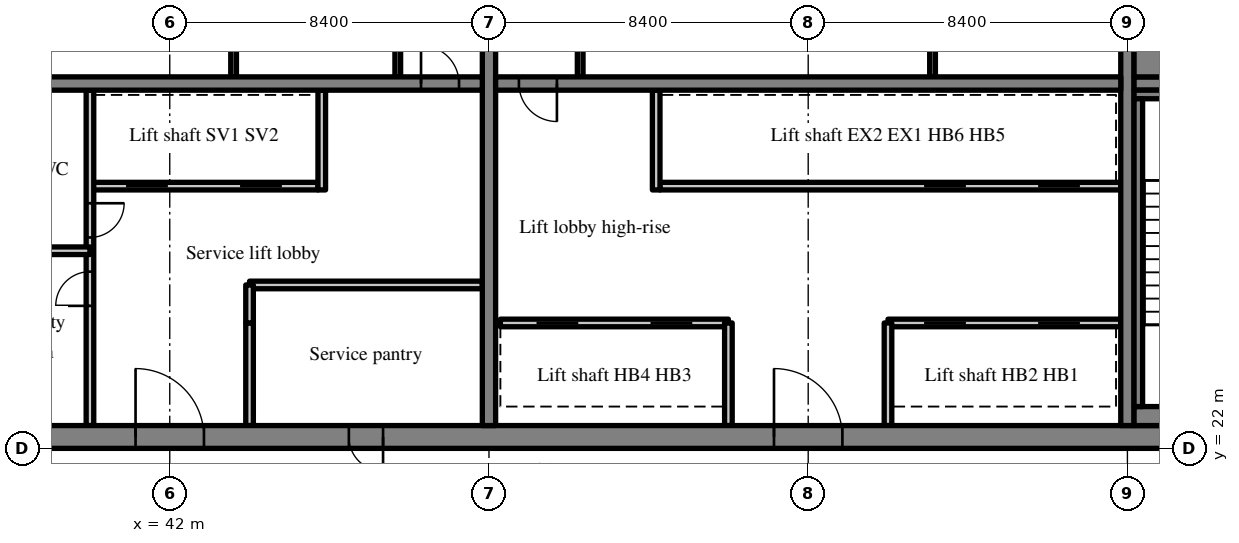
"""IFC4 building model, lengths in metres.
Left out: names, types, materials, properties, quantities, classifications, styles, units other than length and angle.
Written with IfcOpenShell. Run it as: python <this file> out.ifc"""

import sys

from ifc_helpers import new_model, si_unit, direction, frame, frame_2d, origin, place, context, subcontext, project, spatial, rectangle, extrude, source, transform, mapped, element, fill, save


model = new_model("IFC4")
c1 = context("Model", 3, precision=1e-05, world=origin(), true_north=direction((0.0, 1.0)))
c2 = subcontext(c1, "Body", "Model", "MODEL_VIEW")
j1 = project(units=[si_unit("LENGTHUNIT", "METRE"), si_unit("PLANEANGLEUNIT", "RADIAN")], contexts=[c1])
p1 = place(None, origin())
s1 = spatial("IfcSite", under=j1, at=p1, CompositionType="ELEMENT")
p2 = place(p1, origin())
s2 = spatial("IfcBuilding", under=s1, at=p2, CompositionType="ELEMENT")
p3 = place(p2, frame((0.0, 0.0, 237.4)))
s3 = spatial("IfcBuildingStorey", under=s2, at=p3, CompositionType="ELEMENT", Elevation=237.4)
m1 = source(origin(), c2, "Body", "SweptSolid", [
    extrude(rectangle(XDim=50.4, YDim=0.6, at=frame_2d((25.2, 0.0))), origin(), (0.0, 0.0, 1.0), 3.62),
])
p4 = place(p3, frame((25.2, 22.3, 0.0), z_axis=(0.0, 0.0, 1.0), x_axis=(1.0, 0.0, 0.0)))
e1 = element("IfcWall", 1, at=p4, inside=s3, PredefinedType="SHEAR", context=c2, shape_type="MappedRepresentation", body=[
    mapped(m1, transform((0.0, 0.0, 0.0), scale=1.0)),
])
m2 = source(origin(), c2, "Body", "SweptSolid", [
    extrude(rectangle(XDim=1.8, YDim=2.1, at=frame_2d((0.9, 1.05))), frame((0.0, 0.31, 0.0), z_axis=(0.0, -1.0, 0.0), x_axis=(1.0, 0.0, 0.0)), (0.0, 0.0, 1.0), 0.62),
])
p5 = place(p4, frame((15.9, 0.0, 0.0)))
e2 = element("IfcOpeningElement", 2, at=p5, cuts=e1, PredefinedType="OPENING", context=c2, shape_type="MappedRepresentation", body=[
    mapped(m2, transform((0.0, 0.0, 0.0), scale=1.0)),
])
m3 = source(origin(), c2, "Body", "SweptSolid", [
    extrude(rectangle(XDim=0.9, YDim=2.1, at=frame_2d((0.45, 1.05))), frame((0.0, 0.31, 0.0), z_axis=(0.0, -1.0, 0.0), x_axis=(1.0, 0.0, 0.0)), (0.0, 0.0, 1.0), 0.62),
])
p6 = place(p4, frame((9.687, 0.0, 0.0)))
e3 = element("IfcOpeningElement", 3, at=p6, cuts=e1, PredefinedType="OPENING", context=c2, shape_type="MappedRepresentation", body=[
    mapped(m3, transform((0.0, 0.0, 0.0), scale=1.0)),
])
p7 = place(p4, frame((21.513, 0.0, 0.0)))
e4 = element("IfcOpeningElement", 4, at=p7, cuts=e1, PredefinedType="OPENING", context=c2, shape_type="MappedRepresentation", body=[
    mapped(m3, transform((0.0, 0.0, 0.0), scale=1.0)),
])
p8 = place(p4, frame((32.7, 0.0, 0.0)))
e5 = element("IfcOpeningElement", 5, at=p8, cuts=e1, PredefinedType="OPENING", context=c2, shape_type="MappedRepresentation", body=[
    mapped(m2, transform((0.0, 0.0, 0.0), scale=1.0)),
])
m4 = source(origin(), c2, "Body", "SweptSolid", [
    extrude(rectangle(XDim=1.2, YDim=2.1, at=frame_2d((0.6, 1.05))), frame((0.0, 0.31, 0.0), z_axis=(0.0, -1.0, 0.0), x_axis=(1.0, 0.0, 0.0)), (0.0, 0.0, 1.0), 0.62),
])
p9 = place(p4, frame((6.488, 0.0, 0.0)))
e6 = element("IfcOpeningElement", 6, at=p9, cuts=e1, PredefinedType="OPENING", context=c2, shape_type="MappedRepresentation", body=[
    mapped(m4, transform((0.0, 0.0, 0.0), scale=1.0)),
])
p10 = place(p4, frame((47.925, 0.0, 0.0)))
e7 = element("IfcOpeningElement", 7, at=p10, cuts=e1, PredefinedType="OPENING", context=c2, shape_type="MappedRepresentation", body=[
    mapped(m4, transform((0.0, 0.0, 0.0), scale=1.0)),
])
m5 = source(origin(), c2, "Body", "SweptSolid", [
    extrude(rectangle(XDim=18.8, YDim=0.35, at=frame_2d((9.4, 0.0))), origin(), (0.0, 0.0, 1.0), 3.62),
])
p11 = place(p3, frame((50.4, 22.6, 0.0), z_axis=(0.0, 0.0, 1.0), x_axis=(0.0, 1.0, 0.0)))
e8 = element("IfcWall", 8, at=p11, inside=s3, PredefinedType="SHEAR", context=c2, shape_type="MappedRepresentation", body=[
    mapped(m5, transform((0.0, 0.0, 0.0), scale=1.0)),
])
m6 = source(origin(), c2, "Body", "SweptSolid", [
    extrude(rectangle(XDim=1.1, YDim=2.1, at=frame_2d((0.55, 1.05))), frame((0.0, 0.185, 0.0), z_axis=(0.0, -1.0, 0.0), x_axis=(1.0, 0.0, 0.0)), (0.0, 0.0, 1.0), 0.37),
])
p12 = place(p11, frame((12.85, 0.0, 0.0)))
e9 = element("IfcOpeningElement", 9, at=p12, cuts=e8, PredefinedType="OPENING", context=c2, shape_type="MappedRepresentation", body=[
    mapped(m6, transform((0.0, 0.0, 0.0), scale=1.0)),
])
p13 = place(p3, frame((67.2, 22.6, 0.0), z_axis=(0.0, 0.0, 1.0), x_axis=(0.0, 1.0, 0.0)))
e10 = element("IfcWall", 10, at=p13, inside=s3, PredefinedType="SHEAR", context=c2, shape_type="MappedRepresentation", body=[
    mapped(m5, transform((0.0, 0.0, 0.0), scale=1.0)),
])
m7 = source(origin(), c2, "Body", "SweptSolid", [
    extrude(rectangle(XDim=16.45, YDim=0.35, at=frame_2d((8.225, 0.0))), origin(), (0.0, 0.0, 1.0), 3.62),
])
p14 = place(p3, frame((33.775, 31.6, 0.0), z_axis=(0.0, 0.0, 1.0), x_axis=(1.0, 0.0, 0.0)))
e11 = element("IfcWall", 11, at=p14, inside=s3, PredefinedType="SHEAR", context=c2, shape_type="MappedRepresentation", body=[
    mapped(m7, transform((0.0, 0.0, 0.0), scale=1.0)),
])
m8 = source(origin(), c2, "Body", "SweptSolid", [
    extrude(rectangle(XDim=1.0, YDim=2.1, at=frame_2d((0.5, 1.05))), frame((0.0, 0.185, 0.0), z_axis=(0.0, -1.0, 0.0), x_axis=(1.0, 0.0, 0.0)), (0.0, 0.0, 1.0), 0.37),
])
p15 = place(p14, frame((14.837, 0.0, 0.0)))
e12 = element("IfcOpeningElement", 12, at=p15, cuts=e11, PredefinedType="OPENING", context=c2, shape_type="MappedRepresentation", body=[
    mapped(m8, transform((0.0, 0.0, 0.0), scale=1.0)),
])
m9 = source(origin(), c2, "Body", "SweptSolid", [
    extrude(rectangle(XDim=16.45, YDim=0.35, at=frame_2d((8.225, 0.0))), origin(), (0.0, 0.0, 1.0), 3.62),
])
p16 = place(p3, frame((50.575, 31.6, 0.0), z_axis=(0.0, 0.0, 1.0), x_axis=(1.0, 0.0, 0.0)))
e13 = element("IfcWall", 13, at=p16, inside=s3, PredefinedType="SHEAR", context=c2, shape_type="MappedRepresentation", body=[
    mapped(m9, transform((0.0, 0.0, 0.0), scale=1.0)),
])
p17 = place(p16, frame((0.613, 0.0, 0.0)))
e14 = element("IfcOpeningElement", 14, at=p17, cuts=e13, PredefinedType="OPENING", context=c2, shape_type="MappedRepresentation", body=[
    mapped(m8, transform((0.0, 0.0, 0.0), scale=1.0)),
])
m10 = source(origin(), c2, "Body", "SweptSolid", [
    extrude(rectangle(XDim=7.625, YDim=0.35, at=frame_2d((3.812, 0.0))), origin(), (0.0, 0.0, 1.0), 3.62),
])
p18 = place(p3, frame((67.375, 31.6, 0.0), z_axis=(0.0, 0.0, 1.0), x_axis=(1.0, 0.0, 0.0)))
e15 = element("IfcWall", 15, at=p18, inside=s3, PredefinedType="SHEAR", context=c2, shape_type="MappedRepresentation", body=[
    mapped(m10, transform((0.0, 0.0, 0.0), scale=1.0)),
])
p19 = place(p18, frame((5.8, 0.0, 0.0)))
e16 = element("IfcOpeningElement", 16, at=p19, cuts=e15, PredefinedType="OPENING", context=c2, shape_type="MappedRepresentation", body=[
    mapped(m6, transform((0.0, 0.0, 0.0), scale=1.0)),
])
m11 = source(origin(), c2, "Body", "SweptSolid", [
    extrude(rectangle(XDim=6.0, YDim=0.2, at=frame_2d((3.0, 0.0))), origin(), (0.0, 0.0, 1.0), 3.62),
])
p20 = place(p3, frame((39.9, 28.9, 0.0), z_axis=(0.0, 0.0, 1.0), x_axis=(1.0, 0.0, 0.0)))
e17 = element("IfcWall", 17, at=p20, inside=s3, PredefinedType="SOLIDWALL", context=c2, shape_type="MappedRepresentation", body=[
    mapped(m11, transform((0.0, 0.0, 0.0), scale=1.0)),
])
m12 = source(origin(), c2, "Body", "SweptSolid", [
    extrude(rectangle(XDim=1.1, YDim=2.1, at=frame_2d((0.55, 1.05))), frame((0.0, 0.11, 0.0), z_axis=(0.0, -1.0, 0.0), x_axis=(1.0, 0.0, 0.0)), (0.0, 0.0, 1.0), 0.22),
])
p21 = place(p20, frame((0.95, 0.0, 0.0)))
e18 = element("IfcOpeningElement", 18, at=p21, cuts=e17, PredefinedType="OPENING", context=c2, shape_type="MappedRepresentation", body=[
    mapped(m12, transform((0.0, 0.0, 0.0), scale=1.0)),
])
p22 = place(p20, frame((3.95, 0.0, 0.0)))
e19 = element("IfcOpeningElement", 19, at=p22, cuts=e17, PredefinedType="OPENING", context=c2, shape_type="MappedRepresentation", body=[
    mapped(m12, transform((0.0, 0.0, 0.0), scale=1.0)),
])
m13 = source(origin(), c2, "Body", "SweptSolid", [
    extrude(rectangle(XDim=8.825, YDim=0.2, at=frame_2d((4.413, 0.0))), origin(), (0.0, 0.0, 1.0), 3.62),
])
p23 = place(p3, frame((39.9, 22.6, 0.0), z_axis=(0.0, 0.0, 1.0), x_axis=(0.0, 1.0, 0.0)))
e20 = element("IfcWall", 20, at=p23, inside=s3, PredefinedType="PARTITIONING", context=c2, shape_type="MappedRepresentation", body=[
    mapped(m13, transform((0.0, 0.0, 0.0), scale=1.0)),
])
m14 = source(origin(), c2, "Body", "SweptSolid", [
    extrude(rectangle(XDim=0.9, YDim=2.1, at=frame_2d((0.45, 1.05))), frame((0.0, 0.11, 0.0), z_axis=(0.0, -1.0, 0.0), x_axis=(1.0, 0.0, 0.0)), (0.0, 0.0, 1.0), 0.22),
])
p24 = place(p23, frame((3.15, 0.0, 0.0)))
e21 = element("IfcOpeningElement", 21, at=p24, cuts=e20, PredefinedType="OPENING", context=c2, shape_type="MappedRepresentation", body=[
    mapped(m14, transform((0.0, 0.0, 0.0), scale=1.0)),
])
p25 = place(p23, frame((4.95, 0.0, 0.0)))
e22 = element("IfcOpeningElement", 22, at=p25, cuts=e20, PredefinedType="OPENING", context=c2, shape_type="MappedRepresentation", body=[
    mapped(m14, transform((0.0, 0.0, 0.0), scale=1.0)),
])
m15 = source(origin(), c2, "Body", "SweptSolid", [
    extrude(rectangle(XDim=2.7, YDim=0.2, at=frame_2d((1.35, 0.0))), origin(), (0.0, 0.0, 1.0), 3.62),
])
p26 = place(p3, frame((44.1, 22.6, 0.0), z_axis=(0.0, 0.0, 1.0), x_axis=(0.0, 1.0, 0.0)))
e23 = element("IfcWall", 23, at=p26, inside=s3, PredefinedType="PARTITIONING", context=c2, shape_type="MappedRepresentation", body=[
    mapped(m15, transform((0.0, 0.0, 0.0), scale=1.0)),
])
m16 = source(origin(), c2, "Body", "SweptSolid", [
    extrude(rectangle(XDim=2.625, YDim=0.2, at=frame_2d((1.312, 0.0))), origin(), (0.0, 0.0, 1.0), 3.62),
])
p27 = place(p3, frame((46.0, 28.8, 0.0), z_axis=(0.0, 0.0, 1.0), x_axis=(0.0, 1.0, 0.0)))
e24 = element("IfcWall", 24, at=p27, inside=s3, PredefinedType="SOLIDWALL", context=c2, shape_type="MappedRepresentation", body=[
    mapped(m16, transform((0.0, 0.0, 0.0), scale=1.0)),
])
m17 = source(origin(), c2, "Body", "SweptSolid", [
    extrude(rectangle(XDim=3.0, YDim=0.2, at=frame_2d((1.5, 0.0))), origin(), (0.0, 0.0, 1.0), 3.62),
])
p28 = place(p3, frame((36.9, 27.2, 0.0), z_axis=(0.0, 0.0, 1.0), x_axis=(1.0, 0.0, 0.0)))
e25 = element("IfcWall", 25, at=p28, inside=s3, PredefinedType="PARTITIONING", context=c2, shape_type="MappedRepresentation", body=[
    mapped(m17, transform((0.0, 0.0, 0.0), scale=1.0)),
])
m18 = source(origin(), c2, "Body", "SweptSolid", [
    extrude(rectangle(XDim=6.125, YDim=0.2, at=frame_2d((3.062, 0.0))), origin(), (0.0, 0.0, 1.0), 3.62),
])
p29 = place(p3, frame((44.1, 26.3, 0.0), z_axis=(0.0, 0.0, 1.0), x_axis=(1.0, 0.0, 0.0)))
e26 = element("IfcWall", 26, at=p29, inside=s3, PredefinedType="PARTITIONING", context=c2, shape_type="MappedRepresentation", body=[
    mapped(m18, transform((0.0, 0.0, 0.0), scale=1.0)),
])
m19 = source(origin(), c2, "Body", "SweptSolid", [
    extrude(rectangle(XDim=1.0, YDim=0.2, at=frame_2d((0.5, 0.0))), origin(), (0.0, 0.0, 1.0), 3.62),
])
p30 = place(p3, frame((44.1, 25.3, 0.0), z_axis=(0.0, 0.0, 1.0), x_axis=(0.0, 1.0, 0.0)))
e27 = element("IfcWall", 27, at=p30, inside=s3, PredefinedType="PARTITIONING", context=c2, shape_type="MappedRepresentation", body=[
    mapped(m19, transform((0.0, 0.0, 0.0), scale=1.0)),
])
m20 = source(origin(), c2, "Body", "SweptSolid", [
    extrude(rectangle(XDim=3.225, YDim=0.15, at=frame_2d((1.613, 0.0))), origin(), (0.0, 0.0, 1.0), 3.62),
])
for number, where, z_axis, x_axis in (
    (28, (48.0, 31.775, 0.0), (0.0, 0.0, 1.0), (0.0, 1.0, 0.0)),
    (29, (43.68, 31.775, 0.0), (0.0, 0.0, 1.0), (0.0, 1.0, 0.0)),
):
    element("IfcWall", number, at=place(p3, frame(where, z_axis=z_axis, x_axis=x_axis)), inside=s3, PredefinedType="PARTITIONING", context=c2, shape_type="MappedRepresentation", body=[
        mapped(m20, transform((0.0, 0.0, 0.0), scale=1.0)),
    ])
p31 = place(p3, frame((67.025, 25.3, 0.0), z_axis=(0.0, 0.0, 1.0), x_axis=(-1.0, 0.0, 0.0)))
e30 = element("IfcWall", 30, at=p31, inside=s3, PredefinedType="SOLIDWALL", context=c2, shape_type="MappedRepresentation", body=[
    mapped(m18, transform((0.0, 0.0, 0.0), scale=1.0)),
])
p32 = place(p31, frame((1.075, 0.0, 0.0)))
e31 = element("IfcOpeningElement", 31, at=p32, cuts=e30, PredefinedType="OPENING", context=c2, shape_type="MappedRepresentation", body=[
    mapped(m12, transform((0.0, 0.0, 0.0), scale=1.0)),
])
p33 = place(p31, frame((4.075, 0.0, 0.0)))
e32 = element("IfcOpeningElement", 32, at=p33, cuts=e30, PredefinedType="OPENING", context=c2, shape_type="MappedRepresentation", body=[
    mapped(m12, transform((0.0, 0.0, 0.0), scale=1.0)),
])
p34 = place(p3, frame((56.7, 25.3, 0.0), z_axis=(0.0, 0.0, 1.0), x_axis=(-1.0, 0.0, 0.0)))
e33 = element("IfcWall", 33, at=p34, inside=s3, PredefinedType="SOLIDWALL", context=c2, shape_type="MappedRepresentation", body=[
    mapped(m11, transform((0.0, 0.0, 0.0), scale=1.0)),
])
p35 = place(p34, frame((0.95, 0.0, 0.0)))
e34 = element("IfcOpeningElement", 34, at=p35, cuts=e33, PredefinedType="OPENING", context=c2, shape_type="MappedRepresentation", body=[
    mapped(m12, transform((0.0, 0.0, 0.0), scale=1.0)),
])
p36 = place(p34, frame((3.95, 0.0, 0.0)))
e35 = element("IfcOpeningElement", 35, at=p36, cuts=e33, PredefinedType="OPENING", context=c2, shape_type="MappedRepresentation", body=[
    mapped(m12, transform((0.0, 0.0, 0.0), scale=1.0)),
])
m21 = source(origin(), c2, "Body", "SweptSolid", [
    extrude(rectangle(XDim=12.125, YDim=0.2, at=frame_2d((6.062, 0.0))), origin(), (0.0, 0.0, 1.0), 3.62),
])
p37 = place(p3, frame((67.025, 28.9, 0.0), z_axis=(0.0, 0.0, 1.0), x_axis=(-1.0, 0.0, 0.0)))
e36 = element("IfcWall", 36, at=p37, inside=s3, PredefinedType="SOLIDWALL", context=c2, shape_type="MappedRepresentation", body=[
    mapped(m21, transform((0.0, 0.0, 0.0), scale=1.0)),
])
p38 = place(p37, frame((1.075, 0.0, 0.0)))
e37 = element("IfcOpeningElement", 37, at=p38, cuts=e36, PredefinedType="OPENING", context=c2, shape_type="MappedRepresentation", body=[
    mapped(m12, transform((0.0, 0.0, 0.0), scale=1.0)),
])
p39 = place(p37, frame((4.075, 0.0, 0.0)))
e38 = element("IfcOpeningElement", 38, at=p39, cuts=e36, PredefinedType="OPENING", context=c2, shape_type="MappedRepresentation", body=[
    mapped(m12, transform((0.0, 0.0, 0.0), scale=1.0)),
])
for number, where, z_axis, x_axis in (
    (39, (60.9, 22.6, 0.0), (0.0, 0.0, 1.0), (0.0, 1.0, 0.0)),
    (40, (56.7, 22.6, 0.0), (0.0, 0.0, 1.0), (0.0, 1.0, 0.0)),
):
    element("IfcWall", number, at=place(p3, frame(where, z_axis=z_axis, x_axis=x_axis)), inside=s3, PredefinedType="SOLIDWALL", context=c2, shape_type="MappedRepresentation", body=[
        mapped(m15, transform((0.0, 0.0, 0.0), scale=1.0)),
    ])
p40 = place(p3, frame((54.8, 28.8, 0.0), z_axis=(0.0, 0.0, 1.0), x_axis=(0.0, 1.0, 0.0)))
e41 = element("IfcWall", 41, at=p40, inside=s3, PredefinedType="SOLIDWALL", context=c2, shape_type="MappedRepresentation", body=[
    mapped(m16, transform((0.0, 0.0, 0.0), scale=1.0)),
])
for number, where, z_axis, x_axis in (
    (42, (52.8, 31.775, 0.0), (0.0, 0.0, 1.0), (0.0, 1.0, 0.0)),
    (43, (62.072, 31.775, 0.0), (0.0, 0.0, 1.0), (0.0, 1.0, 0.0)),
):
    element("IfcWall", number, at=place(p3, frame(where, z_axis=z_axis, x_axis=x_axis)), inside=s3, PredefinedType="PARTITIONING", context=c2, shape_type="MappedRepresentation", body=[
        mapped(m20, transform((0.0, 0.0, 0.0), scale=1.0)),
    ])
m22 = source(origin(), c2, "Body", "SweptSolid", [
    extrude(rectangle(XDim=4.875, YDim=0.5, at=frame_2d((2.438, 0.0))), origin(), (0.0, 0.0, 1.0), 3.62),
])
p41 = place(p3, frame((67.375, 22.85, 0.0), z_axis=(0.0, 0.0, 1.0), x_axis=(1.0, 0.0, 0.0)))
e44 = element("IfcWall", 44, at=p41, inside=s3, PredefinedType="SOLIDWALL", context=c2, shape_type="MappedRepresentation", body=[
    mapped(m22, transform((0.0, 0.0, 0.0), scale=1.0)),
])
m23 = source(origin(), c2, "Body", "SweptSolid", [
    extrude(rectangle(XDim=4.875, YDim=0.225, at=frame_2d((2.438, 0.0))), origin(), (0.0, 0.0, 1.0), 3.62),
])
p42 = place(p3, frame((67.375, 31.312, 0.0), z_axis=(0.0, 0.0, 1.0), x_axis=(1.0, 0.0, 0.0)))
e45 = element("IfcWall", 45, at=p42, inside=s3, PredefinedType="SOLIDWALL", context=c2, shape_type="MappedRepresentation", body=[
    mapped(m23, transform((0.0, 0.0, 0.0), scale=1.0)),
])
m24 = source(origin(), c2, "Body", "SweptSolid", [
    extrude(rectangle(XDim=8.1, YDim=0.225, at=frame_2d((4.05, 0.0))), origin(), (0.0, 0.0, 1.0), 3.62),
])
p43 = place(p3, frame((67.487, 23.1, 0.0), z_axis=(0.0, 0.0, 1.0), x_axis=(0.0, 1.0, 0.0)))
e46 = element("IfcWall", 46, at=p43, inside=s3, PredefinedType="SOLIDWALL", context=c2, shape_type="MappedRepresentation", body=[
    mapped(m24, transform((0.0, 0.0, 0.0), scale=1.0)),
])
m25 = source(origin(), c2, "Body", "SweptSolid", [
    extrude(rectangle(XDim=4.875, YDim=1.025, at=frame_2d((2.438, 0.0))), origin(), (0.0, 0.0, 1.0), 3.62),
])
p44 = place(p3, frame((67.375, 32.287, 0.0), z_axis=(0.0, 0.0, 1.0), x_axis=(1.0, 0.0, 0.0)))
e47 = element("IfcWall", 47, at=p44, inside=s3, PredefinedType="SOLIDWALL", context=c2, shape_type="MappedRepresentation", body=[
    mapped(m25, transform((0.0, 0.0, 0.0), scale=1.0)),
])
m26 = source(origin(), c2, "Body", "SweptSolid", [
    extrude(rectangle(XDim=1.8, YDim=2.1, at=frame_2d((0.9, 1.05))), frame((0.0, 0.225, 0.0), z_axis=(0.0, -1.0, 0.0), x_axis=(1.0, 0.0, 0.0)), (0.0, 0.0, 1.0), 0.05),
])
p45 = place(p5, origin())
e48 = element("IfcDoor", 48, at=p45, inside=s3, OperationType="DOUBLE_DOOR_SINGLE_SWING", PredefinedType="DOOR", context=c2, shape_type="MappedRepresentation", body=[
    mapped(m26, transform((0.0, 0.0, 0.0), scale=1.0)),
])
fill(e2, e48)
m27 = source(origin(), c2, "Body", "SweptSolid", [
    extrude(rectangle(XDim=1.0, YDim=2.1, at=frame_2d((0.5, 1.05))), frame((0.0, 0.025, 0.0), z_axis=(0.0, -1.0, 0.0), x_axis=(1.0, 0.0, 0.0)), (0.0, 0.0, 1.0), 0.05),
])
p46 = place(p15, origin())
e49 = element("IfcDoor", 49, at=p46, inside=s3, OperationType="SINGLE_SWING_LEFT", PredefinedType="DOOR", context=c2, shape_type="MappedRepresentation", body=[
    mapped(m27, transform((0.0, 0.0, 0.0), scale=1.0)),
])
fill(e12, e49)
m28 = source(origin(), c2, "Body", "SweptSolid", [
    extrude(rectangle(XDim=1.1, YDim=2.1, at=frame_2d((0.55, 1.05))), frame((0.0, 0.025, 0.0), z_axis=(0.0, -1.0, 0.0), x_axis=(1.0, 0.0, 0.0)), (0.0, 0.0, 1.0), 0.05),
])
p47 = place(p21, origin())
e50 = element("IfcDoor", 50, at=p47, inside=s3, OperationType="SLIDING_TO_LEFT", PredefinedType="DOOR", context=c2, shape_type="MappedRepresentation", body=[
    mapped(m28, transform((0.0, 0.0, 0.0), scale=1.0)),
])
fill(e18, e50)
p48 = place(p22, origin())
e51 = element("IfcDoor", 51, at=p48, inside=s3, OperationType="SLIDING_TO_RIGHT", PredefinedType="DOOR", context=c2, shape_type="MappedRepresentation", body=[
    mapped(m28, transform((0.0, 0.0, 0.0), scale=1.0)),
])
fill(e19, e51)
m29 = source(origin(), c2, "Body", "SweptSolid", [
    extrude(rectangle(XDim=0.9, YDim=2.1, at=frame_2d((0.45, 1.05))), frame((0.0, 0.025, 0.0), z_axis=(0.0, -1.0, 0.0), x_axis=(1.0, 0.0, 0.0)), (0.0, 0.0, 1.0), 0.05),
])
p49 = place(p24, origin())
e52 = element("IfcDoor", 52, at=p49, inside=s3, OperationType="SINGLE_SWING_LEFT", PredefinedType="DOOR", context=c2, shape_type="MappedRepresentation", body=[
    mapped(m29, transform((0.0, 0.0, 0.0), scale=1.0)),
])
fill(e21, e52)
p50 = place(p25, origin())
e53 = element("IfcDoor", 53, at=p50, inside=s3, OperationType="SINGLE_SWING_RIGHT", PredefinedType="DOOR", context=c2, shape_type="MappedRepresentation", body=[
    mapped(m29, transform((0.0, 0.0, 0.0), scale=1.0)),
])
fill(e22, e53)
m30 = source(origin(), c2, "Body", "SweptSolid", [
    extrude(rectangle(XDim=0.9, YDim=2.1, at=frame_2d((0.45, 1.05))), frame((0.0, 0.225, 0.0), z_axis=(0.0, -1.0, 0.0), x_axis=(1.0, 0.0, 0.0)), (0.0, 0.0, 1.0), 0.05),
])
p51 = place(p7, origin())
e54 = element("IfcDoor", 54, at=p51, inside=s3, OperationType="SINGLE_SWING_RIGHT", PredefinedType="DOOR", context=c2, shape_type="MappedRepresentation", body=[
    mapped(m30, transform((0.0, 0.0, 0.0), scale=1.0)),
])
fill(e4, e54)
p52 = place(p8, origin())
e55 = element("IfcDoor", 55, at=p52, inside=s3, OperationType="DOUBLE_DOOR_SINGLE_SWING", PredefinedType="DOOR", context=c2, shape_type="MappedRepresentation", body=[
    mapped(m26, transform((0.0, 0.0, 0.0), scale=1.0)),
])
fill(e5, e55)
p53 = place(p17, origin())
e56 = element("IfcDoor", 56, at=p53, inside=s3, OperationType="SINGLE_SWING_RIGHT", PredefinedType="DOOR", context=c2, shape_type="MappedRepresentation", body=[
    mapped(m27, transform((0.0, 0.0, 0.0), scale=1.0)),
])
fill(e14, e56)
p54 = place(p32, origin())
e57 = element("IfcDoor", 57, at=p54, inside=s3, OperationType="SLIDING_TO_RIGHT", PredefinedType="DOOR", context=c2, shape_type="MappedRepresentation", body=[
    mapped(m28, transform((0.0, 0.0, 0.0), scale=1.0)),
])
fill(e31, e57)
p55 = place(p33, origin())
e58 = element("IfcDoor", 58, at=p55, inside=s3, OperationType="SLIDING_TO_LEFT", PredefinedType="DOOR", context=c2, shape_type="MappedRepresentation", body=[
    mapped(m28, transform((0.0, 0.0, 0.0), scale=1.0)),
])
fill(e32, e58)
p56 = place(p35, origin())
e59 = element("IfcDoor", 59, at=p56, inside=s3, OperationType="SLIDING_TO_RIGHT", PredefinedType="DOOR", context=c2, shape_type="MappedRepresentation", body=[
    mapped(m28, transform((0.0, 0.0, 0.0), scale=1.0)),
])
fill(e34, e59)
p57 = place(p36, origin())
e60 = element("IfcDoor", 60, at=p57, inside=s3, OperationType="SLIDING_TO_LEFT", PredefinedType="DOOR", context=c2, shape_type="MappedRepresentation", body=[
    mapped(m28, transform((0.0, 0.0, 0.0), scale=1.0)),
])
fill(e35, e60)
p58 = place(p38, origin())
e61 = element("IfcDoor", 61, at=p58, inside=s3, OperationType="SLIDING_TO_RIGHT", PredefinedType="DOOR", context=c2, shape_type="MappedRepresentation", body=[
    mapped(m28, transform((0.0, 0.0, 0.0), scale=1.0)),
])
fill(e37, e61)
p59 = place(p39, origin())
e62 = element("IfcDoor", 62, at=p59, inside=s3, OperationType="SLIDING_TO_LEFT", PredefinedType="DOOR", context=c2, shape_type="MappedRepresentation", body=[
    mapped(m28, transform((0.0, 0.0, 0.0), scale=1.0)),
])
fill(e38, e62)
save(model, sys.argv[1])
